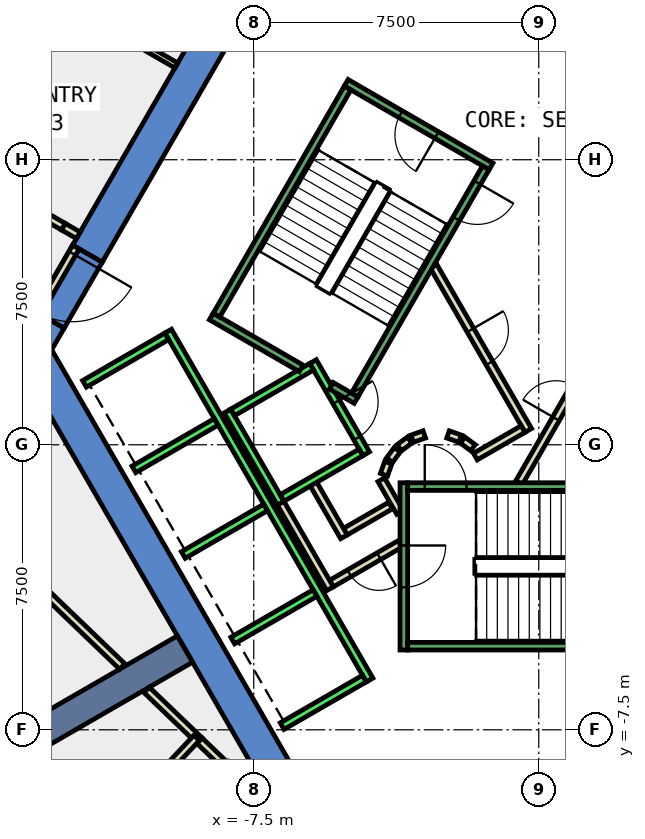
"""IFC4 building model, lengths in metres.
Left out: names, types, materials, properties, quantities, classifications, styles, units other than length and angle.
Written with IfcOpenShell. Run it as: python <this file> out.ifc"""

import sys

from ifc_helpers import new_model, si_unit, direction, frame, frame_2d, origin, place, context, subcontext, project, spatial, polyline, rectangle, outline, extrude, element, fill, save


model = new_model("IFC4")
c1 = context("Model", 3, precision=1e-05, world=origin(), true_north=direction((0.0, 1.0)))
c2 = subcontext(c1, "Body", "Model", "MODEL_VIEW")
j1 = project(units=[si_unit("LENGTHUNIT", "METRE"), si_unit("PLANEANGLEUNIT", "RADIAN")], contexts=[c1])
p1 = place(None, origin())
s1 = spatial("IfcSite", under=j1, at=p1, CompositionType="ELEMENT")
p2 = place(p1, origin())
s2 = spatial("IfcBuilding", under=s1, at=p2, CompositionType="ELEMENT")
p3 = place(p2, frame((0.0, 0.0, 99.2)))
s3 = spatial("IfcBuildingStorey", under=s2, at=p3, CompositionType="ELEMENT", Elevation=99.2)
p4 = place(p3, frame((0.0, 0.0, -0.4)))
e1 = element("IfcWall", 1, at=p4, inside=s3, PredefinedType="SHEAR", context=c2, shape_type="SweptSolid", body=[
    extrude(outline(polyline([(-12.267, 5.252), (-11.488, 4.802), (-6.409, 13.6), (-6.928, 14.5), (-12.267, 5.252)])), origin(), (0.0, 0.0, 1.0), 4.2),
])
p5 = place(p3, frame((0.0, 0.0, -0.4)))
e2 = element("IfcWall", 2, at=p5, inside=s3, PredefinedType="SHEAR", context=c2, shape_type="SweptSolid", body=[
    extrude(outline(polyline([(-12.488, 3.07), (-13.267, 3.52), (-13.856, 2.5), (-12.817, 2.5), (-12.488, 3.07)])), origin(), (0.0, 0.0, 1.0), 4.2),
])
p6 = place(p3, frame((0.0, 0.0, 3.6)))
e3 = element("IfcWall", 3, at=p6, inside=s3, PredefinedType="SHEAR", context=c2, shape_type="SweptSolid", body=[
    extrude(outline(polyline([(-13.267, 3.52), (-12.488, 3.07), (-11.488, 4.802), (-12.267, 5.252), (-13.267, 3.52)])), origin(), (0.0, 0.0, 1.0), 0.2),
])
p7 = place(p3, frame((0.0, 0.0, -0.4)))
e4 = element("IfcWall", 4, at=p7, inside=s3, PredefinedType="SHEAR", context=c2, shape_type="SweptSolid", body=[
    extrude(outline(polyline([(-13.856, 2.5), (-6.928, -9.5), (-6.409, -8.6), (-12.817, 2.5), (-13.856, 2.5)])), origin(), (0.0, 0.0, 1.0), 4.2),
])
p8 = place(p3, frame((-9.31, -5.375, -0.4), z_axis=(0.0, 0.0, 1.0), x_axis=(-0.866017533419, -0.500013631625, 0.0)))
e5 = element("IfcWall", 5, at=p8, inside=s3, PredefinedType="SHEAR", context=c2, shape_type="SweptSolid", body=[
    extrude(rectangle(XDim=9.0, YDim=0.8, at=frame_2d((4.5, 0.0))), origin(), (0.0, 0.0, 1.0), 4.2),
])
p9 = place(p3, frame((-15.835, 7.658, 0.0), z_axis=(0.0, 0.0, 1.0), x_axis=(0.866076614194, -0.499911290476, 0.0)))
e6 = element("IfcWall", 6, at=p9, inside=s3, PredefinedType="PARTITIONING", context=c2, shape_type="SweptSolid", body=[
    extrude(rectangle(XDim=3.843, YDim=0.2, at=frame_2d((1.921, 0.0))), origin(), (0.0, 0.0, 1.0), 3.8),
])
p10 = place(p9, frame((1.646, 0.0, 0.0)))
e7 = element("IfcOpeningElement", 7, at=p10, cuts=e6, PredefinedType="OPENING", context=c2, shape_type="SweptSolid", body=[
    extrude(rectangle(XDim=1.0, YDim=2.1, at=frame_2d((0.5, 1.05))), frame((0.0, 0.11, 0.0), z_axis=(0.0, -1.0, 0.0), x_axis=(1.0, 0.0, 0.0)), (0.0, 0.0, 1.0), 0.22),
])
p11 = place(p3, frame((-3.9, -1.599, 0.0), z_axis=(0.0, 0.0, 1.0), x_axis=(-0.865969445389, -0.500096910261, 0.0)))
e8 = element("IfcWall", 8, at=p11, inside=s3, PredefinedType="PARTITIONING", context=c2, shape_type="SweptSolid", body=[
    extrude(rectangle(XDim=1.373, YDim=0.2, at=frame_2d((0.687, 0.0))), origin(), (0.0, 0.0, 1.0), 3.8),
])
p12 = place(p3, frame((-5.126, -2.422, 0.0), z_axis=(0.0, 0.0, 1.0), x_axis=(-0.500062241894, 0.865989465428, 0.0)))
e9 = element("IfcWall", 9, at=p12, inside=s3, PredefinedType="PARTITIONING", context=c2, shape_type="SweptSolid", body=[
    extrude(rectangle(XDim=1.7, YDim=0.2, at=frame_2d((0.85, 0.0))), origin(), (0.0, 0.0, 1.0), 3.8),
])
p13 = place(p3, frame((-3.65, -2.61, 0.0), z_axis=(0.0, 0.0, 1.0), x_axis=(-0.866072462134, -0.499918483688, 0.0)))
e10 = element("IfcWall", 10, at=p13, inside=s3, PredefinedType="PARTITIONING", context=c2, shape_type="SweptSolid", body=[
    extrude(rectangle(XDim=2.084, YDim=0.2, at=frame_2d((1.042, 0.0))), origin(), (0.0, 0.0, 1.0), 3.8),
])
p14 = place(p13, frame((0.642, 0.0, 0.0)))
e11 = element("IfcOpeningElement", 11, at=p14, cuts=e10, PredefinedType="OPENING", context=c2, shape_type="SweptSolid", body=[
    extrude(rectangle(XDim=0.9, YDim=2.1, at=frame_2d((0.45, 1.05))), frame((0.0, 0.11, 0.0), z_axis=(0.0, -1.0, 0.0), x_axis=(1.0, 0.0, 0.0)), (0.0, 0.0, 1.0), 0.22),
])
p15 = place(p3, frame((-5.492, -3.788, 0.0), z_axis=(0.0, 0.0, 1.0), x_axis=(-0.500008949224, 0.866020236886, 0.0)))
e12 = element("IfcWall", 12, at=p15, inside=s3, PredefinedType="PARTITIONING", context=c2, shape_type="SweptSolid", body=[
    extrude(rectangle(XDim=2.68, YDim=0.2, at=frame_2d((1.34, 0.0))), origin(), (0.0, 0.0, 1.0), 3.8),
])
p16 = place(p3, frame((-4.145, -0.92, 0.0), z_axis=(0.0, 0.0, 1.0), x_axis=(0.499743786207, -0.866173278362, 0.0)))
e13 = element("IfcWall", 13, at=p16, inside=s3, PredefinedType="PARTITIONING", context=c2, shape_type="SweptSolid", body=[
    extrude(rectangle(XDim=0.991, YDim=0.2, at=frame_2d((0.495, 0.0))), origin(), (0.0, 0.0, 1.0), 3.8),
])
p17 = place(p3, frame((-9.537, 9.981, 0.0), z_axis=(0.0, 0.0, 1.0), x_axis=(-0.866007866579, 0.5000303741, 0.0)))
e14 = element("IfcWall", 14, at=p17, inside=s3, PredefinedType="PARTITIONING", context=c2, shape_type="SweptSolid", body=[
    extrude(rectangle(XDim=4.278, YDim=0.15, at=frame_2d((2.139, 0.0))), origin(), (0.0, 0.0, 1.0), 3.8),
])
p18 = place(p3, frame((-0.52, -1.0, 0.0), z_axis=(0.0, 0.0, 1.0), x_axis=(0.50011622646, 0.865958290007, 0.0)))
e15 = element("IfcWall", 15, at=p18, inside=s3, PredefinedType="PARTITIONING", context=c2, shape_type="SweptSolid", body=[
    extrude(rectangle(XDim=4.991, YDim=0.2, at=frame_2d((2.496, 0.0))), origin(), (0.0, 0.0, 1.0), 3.8),
])
p19 = place(p18, frame((1.945, 0.0, 0.0)))
e16 = element("IfcOpeningElement", 16, at=p19, cuts=e15, PredefinedType="OPENING", context=c2, shape_type="SweptSolid", body=[
    extrude(rectangle(XDim=1.0, YDim=2.1, at=frame_2d((0.5, 1.05))), frame((0.0, 0.11, 0.0), z_axis=(0.0, -1.0, 0.0), x_axis=(1.0, 0.0, 0.0)), (0.0, 0.0, 1.0), 0.22),
])
p20 = place(p3, frame((-2.771, 4.7, 0.0), z_axis=(0.0, 0.0, 1.0), x_axis=(0.499969479948, -0.866043023828, 0.0)))
e17 = element("IfcWall", 17, at=p20, inside=s3, PredefinedType="PARTITIONING", context=c2, shape_type="SweptSolid", body=[
    extrude(rectangle(XDim=4.99, YDim=0.2, at=frame_2d((2.495, 0.0))), origin(), (0.0, 0.0, 1.0), 3.8),
])
p21 = place(p20, frame((1.945, 0.0, 0.0)))
e18 = element("IfcOpeningElement", 18, at=p21, cuts=e17, PredefinedType="OPENING", context=c2, shape_type="SweptSolid", body=[
    extrude(rectangle(XDim=1.0, YDim=2.1, at=frame_2d((0.5, 1.05))), frame((0.0, 0.11, 0.0), z_axis=(0.0, -1.0, 0.0), x_axis=(1.0, 0.0, 0.0)), (0.0, 0.0, 1.0), 0.22),
])
p22 = place(p3, frame((-0.412, 0.414, 0.0), z_axis=(0.0, 0.0, 1.0), x_axis=(-0.866017369001, -0.500013916395, 0.0)))
e19 = element("IfcWall", 19, at=p22, inside=s3, PredefinedType="PARTITIONING", context=c2, shape_type="SweptSolid", body=[
    extrude(rectangle(XDim=1.45, YDim=0.2, at=frame_2d((0.725, 0.0))), origin(), (0.0, 0.0, 1.0), 3.8),
])
p23 = place(p3, frame((-1.731, -0.077, 0.0), z_axis=(0.0, 0.0, 1.0), x_axis=(-0.804311165252, 0.594208338422, 0.0)))
e20 = element("IfcWall", 20, at=p23, inside=s3, PredefinedType="PARTITIONING", context=c2, shape_type="SweptSolid", body=[
    extrude(rectangle(XDim=0.338, YDim=0.2, at=frame_2d((0.169, 0.0))), origin(), (0.0, 0.0, 1.0), 3.8),
])
p24 = place(p3, frame((-2.07, 0.16, 0.0), z_axis=(0.0, 0.0, 1.0), x_axis=(-0.942199461132, 0.335052496547, 0.0)))
e21 = element("IfcWall", 21, at=p24, inside=s3, PredefinedType="PARTITIONING", context=c2, shape_type="SweptSolid", body=[
    extrude(rectangle(XDim=0.337, YDim=0.2, at=frame_2d((0.169, 0.0))), origin(), (0.0, 0.0, 1.0), 3.8),
])
p25 = place(p3, frame((-3.012, 0.273, 0.0), z_axis=(0.0, 0.0, 1.0), x_axis=(-0.942280615813, -0.334824194261, 0.0)))
e22 = element("IfcWall", 22, at=p25, inside=s3, PredefinedType="PARTITIONING", context=c2, shape_type="SweptSolid", body=[
    extrude(rectangle(XDim=0.338, YDim=0.2, at=frame_2d((0.169, 0.0))), origin(), (0.0, 0.0, 1.0), 3.8),
])
p26 = place(p3, frame((-3.397, 0.124, 0.0), z_axis=(0.0, 0.0, 1.0), x_axis=(-0.804311165252, -0.594208338422, 0.0)))
e23 = element("IfcWall", 23, at=p26, inside=s3, PredefinedType="PARTITIONING", context=c2, shape_type="SweptSolid", body=[
    extrude(rectangle(XDim=0.338, YDim=0.2, at=frame_2d((0.169, 0.0))), origin(), (0.0, 0.0, 1.0), 3.8),
])
p27 = place(p3, frame((-3.723, -0.131, 0.0), z_axis=(0.0, 0.0, 1.0), x_axis=(-0.594675113454, -0.803966112121, 0.0)))
e24 = element("IfcWall", 24, at=p27, inside=s3, PredefinedType="PARTITIONING", context=c2, shape_type="SweptSolid", body=[
    extrude(rectangle(XDim=0.338, YDim=0.2, at=frame_2d((0.169, 0.0))), origin(), (0.0, 0.0, 1.0), 3.8),
])
p28 = place(p3, frame((-3.96, -0.47, 0.0), z_axis=(0.0, 0.0, 1.0), x_axis=(-0.334824194261, -0.942280615813, 0.0)))
e25 = element("IfcWall", 25, at=p28, inside=s3, PredefinedType="PARTITIONING", context=c2, shape_type="SweptSolid", body=[
    extrude(rectangle(XDim=0.338, YDim=0.2, at=frame_2d((0.169, 0.0))), origin(), (0.0, 0.0, 1.0), 3.8),
])
p29 = place(p3, frame((-8.93, -7.783, 0.0), z_axis=(0.0, 0.0, 1.0), x_axis=(0.720954255291, -0.692982656189, 0.0)))
e26 = element("IfcWall", 26, at=p29, inside=s3, PredefinedType="PARTITIONING", context=c2, shape_type="SweptSolid", body=[
    extrude(rectangle(XDim=0.89, YDim=0.2, at=frame_2d((0.445, 0.0))), origin(), (0.0, 0.0, 1.0), 3.8),
])
p30 = place(p3, frame((-8.93, -7.783, 0.0), z_axis=(0.0, 0.0, 1.0), x_axis=(-0.72124523191, 0.692679807305, 0.0)))
e27 = element("IfcWall", 27, at=p30, inside=s3, PredefinedType="PARTITIONING", context=c2, shape_type="SweptSolid", body=[
    extrude(rectangle(XDim=1.923, YDim=0.2, at=frame_2d((0.961, 0.0))), origin(), (0.0, 0.0, 1.0), 3.8),
])
p31 = place(p3, frame((-13.865, -12.876, 0.0), z_axis=(0.0, 0.0, 1.0), x_axis=(0.685651384846, 0.727930064263, 0.0)))
e28 = element("IfcWall", 28, at=p31, inside=s3, PredefinedType="PARTITIONING", context=c2, shape_type="SweptSolid", body=[
    extrude(rectangle(XDim=7.091, YDim=0.2, at=frame_2d((3.545, 0.0))), origin(), (0.0, 0.0, 1.0), 3.8),
])
p32 = place(p3, frame((-12.18, 5.202, 0.0), z_axis=(0.0, 0.0, 1.0), x_axis=(-0.50002537861, -0.866010750942, 0.0)))
e29 = element("IfcWall", 29, at=p32, inside=s3, PredefinedType="PARTITIONING", context=c2, shape_type="SweptSolid", body=[
    extrude(rectangle(XDim=2.0, YDim=0.2, at=frame_2d((1.0, 0.0))), origin(), (0.0, 0.0, 1.0), 2.4),
])
p33 = place(p32, frame((0.19, 0.0, 0.0)))
e30 = element("IfcOpeningElement", 30, at=p33, cuts=e29, PredefinedType="OPENING", context=c2, shape_type="SweptSolid", body=[
    extrude(rectangle(XDim=1.8, YDim=2.1, at=frame_2d((0.9, 1.05))), frame((0.0, 0.11, 0.0), z_axis=(0.0, -1.0, 0.0), x_axis=(1.0, 0.0, 0.0)), (0.0, 0.0, 1.0), 0.22),
])
p34 = place(p3, frame((-10.96, -5.834, 0.0), z_axis=(0.0, 0.0, 1.0), x_axis=(-0.721236335428, 0.692689070549, 0.0)))
e31 = element("IfcWall", 31, at=p34, inside=s3, PredefinedType="PARTITIONING", context=c2, shape_type="SweptSolid", body=[
    extrude(rectangle(XDim=11.246, YDim=0.2, at=frame_2d((5.623, 0.0))), origin(), (0.0, 0.0, 1.0), 3.8),
])
p35 = place(p3, frame((-12.507, 5.737, 0.0), z_axis=(0.0, 0.0, 1.0), x_axis=(0.866167537795, -0.499753735824, 0.0)))
e32 = element("IfcWall", 32, at=p35, inside=s3, PredefinedType="PARTITIONING", context=c2, shape_type="SweptSolid", body=[
    extrude(rectangle(XDim=0.45, YDim=0.2, at=frame_2d((0.225, 0.0))), origin(), (0.0, 0.0, 1.0), 2.4),
])
p36 = place(p3, frame((-5.94, 2.188, 0.0), z_axis=(0.0, 0.0, 1.0), x_axis=(0.49994636267, -0.866056369097, 0.0)))
e33 = element("IfcWall", 33, at=p36, inside=s3, PredefinedType="STANDARD", context=c2, shape_type="SweptSolid", body=[
    extrude(rectangle(XDim=2.8, YDim=0.2, at=frame_2d((1.4, 0.0))), origin(), (0.0, 0.0, 1.0), 3.8),
])
p37 = place(p36, frame((1.225, 0.0, 0.0)))
e34 = element("IfcOpeningElement", 34, at=p37, cuts=e33, PredefinedType="OPENING", context=c2, shape_type="SweptSolid", body=[
    extrude(rectangle(XDim=1.1, YDim=2.1, at=frame_2d((0.55, 1.05))), frame((0.0, 0.11, 0.0), z_axis=(0.0, -1.0, 0.0), x_axis=(1.0, 0.0, 0.0)), (0.0, 0.0, 1.0), 0.22),
])
p38 = place(p3, frame((-8.192, 0.888, 0.0), z_axis=(0.0, 0.0, 1.0), x_axis=(0.49994636267, -0.866056369097, 0.0)))
e35 = element("IfcWall", 35, at=p38, inside=s3, PredefinedType="STANDARD", context=c2, shape_type="SweptSolid", body=[
    extrude(rectangle(XDim=2.8, YDim=0.2, at=frame_2d((1.4, 0.0))), origin(), (0.0, 0.0, 1.0), 3.8),
])
for number, where, z_axis, x_axis in (
    (36, (-5.977, 2.052, 0.0), (0.0, 0.0, 1.0), (-0.866, -0.5, 0.0)),
    (37, (-4.677, -0.2, 0.0), (0.0, 0.0, 1.0), (-0.866, -0.5, 0.0)),
):
    element("IfcWall", number, at=place(p3, frame(where, z_axis=z_axis, x_axis=x_axis)), inside=s3, PredefinedType="STANDARD", context=c2, shape_type="SweptSolid", body=[
        extrude(rectangle(XDim=2.399, YDim=0.2, at=frame_2d((1.2, 0.0))), origin(), (0.0, 0.0, 1.0), 3.8),
    ])
p39 = place(p3, frame((-9.751, 2.99, 0.0), z_axis=(0.0, 0.0, 1.0), x_axis=(0.50000090737, -0.866024879913, 0.0)))
e38 = element("IfcWall", 38, at=p39, inside=s3, PredefinedType="STANDARD", context=c2, shape_type="SweptSolid", body=[
    extrude(rectangle(XDim=10.6, YDim=0.2, at=frame_2d((5.3, 0.0))), origin(), (0.0, 0.0, 1.0), 3.8),
])
p40 = place(p3, frame((-9.788, 2.853, 0.0), z_axis=(0.0, 0.0, 1.0), x_axis=(-0.865998541277, -0.500046524342, 0.0)))
e39 = element("IfcWall", 39, at=p40, inside=s3, PredefinedType="STANDARD", context=c2, shape_type="SweptSolid", body=[
    extrude(rectangle(XDim=2.5, YDim=0.2, at=frame_2d((1.25, 0.0))), origin(), (0.0, 0.0, 1.0), 3.8),
])
for number, where, z_axis, x_axis in (
    (40, (-8.488, 0.602, 0.0), (0.0, 0.0, 1.0), (-0.866, -0.5, 0.0)),
    (41, (-7.188, -1.65, 0.0), (0.0, 0.0, 1.0), (-0.866, -0.5, 0.0)),
    (42, (-5.888, -3.902, 0.0), (0.0, 0.0, 1.0), (-0.866, -0.5, 0.0)),
    (43, (-4.588, -6.153, 0.0), (0.0, 0.0, 1.0), (-0.866, -0.5, 0.0)),
):
    element("IfcWall", number, at=place(p3, frame(where, z_axis=z_axis, x_axis=x_axis)), inside=s3, PredefinedType="STANDARD", context=c2, shape_type="SweptSolid", body=[
        extrude(rectangle(XDim=2.5, YDim=0.2, at=frame_2d((1.25, 0.0))), origin(), (0.0, 0.0, 1.0), 3.8),
    ])
p41 = place(p3, frame((-3.55, -1.0, 0.0), z_axis=(0.0, 0.0, 1.0), x_axis=(0.0, -1.0, 0.0)))
e44 = element("IfcWall", 44, at=p41, inside=s3, PredefinedType="STANDARD", context=c2, shape_type="SweptSolid", body=[
    extrude(rectangle(XDim=4.4, YDim=0.2, at=frame_2d((2.2, 0.0))), origin(), (0.0, 0.0, 1.0), 3.8),
])
p42 = place(p41, frame((1.65, 0.0, 0.0)))
e45 = element("IfcOpeningElement", 45, at=p42, cuts=e44, PredefinedType="OPENING", context=c2, shape_type="SweptSolid", body=[
    extrude(rectangle(XDim=1.1, YDim=2.2, at=frame_2d((0.55, 1.1))), frame((0.0, 0.11, 0.0), z_axis=(0.0, -1.0, 0.0), x_axis=(1.0, 0.0, 0.0)), (0.0, 0.0, 1.0), 0.22),
])
p43 = place(p3, frame((-3.45, -1.1, 0.0), z_axis=(0.0, 0.0, 1.0), x_axis=(1.0, 0.0, 0.0)))
e46 = element("IfcWall", 46, at=p43, inside=s3, PredefinedType="STANDARD", context=c2, shape_type="SweptSolid", body=[
    extrude(rectangle(XDim=6.9, YDim=0.2, at=frame_2d((3.45, 0.0))), origin(), (0.0, 0.0, 1.0), 3.8),
])
p44 = place(p43, frame((0.45, 0.0, 0.0)))
e47 = element("IfcOpeningElement", 47, at=p44, cuts=e46, PredefinedType="OPENING", context=c2, shape_type="SweptSolid", body=[
    extrude(rectangle(XDim=1.1, YDim=2.2, at=frame_2d((0.55, 1.1))), frame((0.0, 0.11, 0.0), z_axis=(0.0, -1.0, 0.0), x_axis=(1.0, 0.0, 0.0)), (0.0, 0.0, 1.0), 0.22),
])
p45 = place(p3, frame((-3.45, -5.3, 0.0), z_axis=(0.0, 0.0, 1.0), x_axis=(1.0, 0.0, 0.0)))
e48 = element("IfcWall", 48, at=p45, inside=s3, PredefinedType="STANDARD", context=c2, shape_type="SweptSolid", body=[
    extrude(rectangle(XDim=6.9, YDim=0.2, at=frame_2d((3.45, 0.0))), origin(), (0.0, 0.0, 1.0), 3.8),
])
p46 = place(p3, frame((-1.256, 7.324, 0.0), z_axis=(0.0, 0.0, 1.0), x_axis=(-0.866046073146, 0.499964197906, 0.0)))
e49 = element("IfcWall", 49, at=p46, inside=s3, PredefinedType="STANDARD", context=c2, shape_type="SweptSolid", body=[
    extrude(rectangle(XDim=4.4, YDim=0.2, at=frame_2d((2.2, 0.0))), origin(), (0.0, 0.0, 1.0), 3.8),
])
p47 = place(p46, frame((1.65, 0.0, 0.0)))
e50 = element("IfcOpeningElement", 50, at=p47, cuts=e49, PredefinedType="OPENING", context=c2, shape_type="SweptSolid", body=[
    extrude(rectangle(XDim=1.1, YDim=2.2, at=frame_2d((0.55, 1.1))), frame((0.0, 0.11, 0.0), z_axis=(0.0, -1.0, 0.0), x_axis=(1.0, 0.0, 0.0)), (0.0, 0.0, 1.0), 0.22),
])
p48 = place(p3, frame((-6.25, 2.01, 0.0), z_axis=(0.0, 0.0, 1.0), x_axis=(-0.86611865017, 0.499838457731, 0.0)))
e51 = element("IfcWall", 51, at=p48, inside=s3, PredefinedType="STANDARD", context=c2, shape_type="SweptSolid", body=[
    extrude(rectangle(XDim=2.733, YDim=0.2, at=frame_2d((1.366, 0.0))), origin(), (0.0, 0.0, 1.0), 3.8),
])
p49 = place(p3, frame((-4.806, 1.176, 0.0), z_axis=(0.0, 0.0, 1.0), x_axis=(-0.866558586415, 0.499075361355, 0.0)))
e52 = element("IfcWall", 52, at=p49, inside=s3, PredefinedType="STANDARD", context=c2, shape_type="SweptSolid", body=[
    extrude(rectangle(XDim=0.751, YDim=0.2, at=frame_2d((0.376, 0.0))), origin(), (0.0, 0.0, 1.0), 3.8),
])
p50 = place(p3, frame((-1.393, 7.288, 0.0), z_axis=(0.0, 0.0, 1.0), x_axis=(-0.499963383562, -0.866046543262, 0.0)))
e53 = element("IfcWall", 53, at=p50, inside=s3, PredefinedType="STANDARD", context=c2, shape_type="SweptSolid", body=[
    extrude(rectangle(XDim=6.9, YDim=0.2, at=frame_2d((3.45, 0.0))), origin(), (0.0, 0.0, 1.0), 3.8),
])
p51 = place(p50, frame((0.45, 0.0, 0.0)))
e54 = element("IfcOpeningElement", 54, at=p51, cuts=e53, PredefinedType="OPENING", context=c2, shape_type="SweptSolid", body=[
    extrude(rectangle(XDim=1.1, YDim=2.2, at=frame_2d((0.55, 1.1))), frame((0.0, 0.11, 0.0), z_axis=(0.0, -1.0, 0.0), x_axis=(1.0, 0.0, 0.0)), (0.0, 0.0, 1.0), 0.22),
])
p52 = place(p3, frame((-5.03, 9.388, 0.0), z_axis=(0.0, 0.0, 1.0), x_axis=(-0.499978703459, -0.866037698999, 0.0)))
e55 = element("IfcWall", 55, at=p52, inside=s3, PredefinedType="STANDARD", context=c2, shape_type="SweptSolid", body=[
    extrude(rectangle(XDim=6.9, YDim=0.2, at=frame_2d((3.45, 0.0))), origin(), (0.0, 0.0, 1.0), 3.8),
])
p53 = place(p19, origin())
e56 = element("IfcDoor", 56, at=p53, inside=s3, OperationType="SINGLE_SWING_LEFT", PredefinedType="DOOR", context=c2, shape_type="SweptSolid", body=[
    extrude(rectangle(XDim=1.0, YDim=2.1, at=frame_2d((0.5, 1.05))), frame((0.0, 0.025, 0.0), z_axis=(0.0, -1.0, 0.0), x_axis=(1.0, 0.0, 0.0)), (0.0, 0.0, 1.0), 0.05),
])
fill(e16, e56)
p54 = place(p21, origin())
e57 = element("IfcDoor", 57, at=p54, inside=s3, OperationType="SINGLE_SWING_RIGHT", PredefinedType="DOOR", context=c2, shape_type="SweptSolid", body=[
    extrude(rectangle(XDim=1.0, YDim=2.1, at=frame_2d((0.5, 1.05))), frame((0.0, 0.025, 0.0), z_axis=(0.0, -1.0, 0.0), x_axis=(1.0, 0.0, 0.0)), (0.0, 0.0, 1.0), 0.05),
])
fill(e18, e57)
p55 = place(p14, origin())
e58 = element("IfcDoor", 58, at=p55, inside=s3, OperationType="SINGLE_SWING_LEFT", PredefinedType="DOOR", context=c2, shape_type="SweptSolid", body=[
    extrude(rectangle(XDim=0.9, YDim=2.1, at=frame_2d((0.45, 1.05))), frame((0.0, 0.025, 0.0), z_axis=(0.0, -1.0, 0.0), x_axis=(1.0, 0.0, 0.0)), (0.0, 0.0, 1.0), 0.05),
])
fill(e11, e58)
p56 = place(p33, origin())
e59 = element("IfcDoor", 59, at=p56, inside=s3, OperationType="DOUBLE_DOOR_SINGLE_SWING", PredefinedType="DOOR", context=c2, shape_type="SweptSolid", body=[
    extrude(rectangle(XDim=1.8, YDim=2.1, at=frame_2d((0.9, 1.05))), frame((0.0, 0.025, 0.0), z_axis=(0.0, -1.0, 0.0), x_axis=(1.0, 0.0, 0.0)), (0.0, 0.0, 1.0), 0.05),
])
fill(e30, e59)
p57 = place(p37, origin())
e60 = element("IfcDoor", 60, at=p57, inside=s3, OperationType="SLIDING_TO_LEFT", PredefinedType="DOOR", context=c2, shape_type="SweptSolid", body=[
    extrude(rectangle(XDim=1.1, YDim=2.1, at=frame_2d((0.55, 1.05))), frame((0.0, 0.025, 0.0), z_axis=(0.0, -1.0, 0.0), x_axis=(1.0, 0.0, 0.0)), (0.0, 0.0, 1.0), 0.05),
])
fill(e34, e60)
p58 = place(p44, origin())
e61 = element("IfcDoor", 61, at=p58, inside=s3, OperationType="SINGLE_SWING_LEFT", PredefinedType="DOOR", context=c2, shape_type="SweptSolid", body=[
    extrude(rectangle(XDim=1.1, YDim=2.2, at=frame_2d((0.55, 1.1))), frame((0.0, 0.025, 0.0), z_axis=(0.0, -1.0, 0.0), x_axis=(1.0, 0.0, 0.0)), (0.0, 0.0, 1.0), 0.05),
])
fill(e47, e61)
p59 = place(p42, origin())
e62 = element("IfcDoor", 62, at=p59, inside=s3, OperationType="SINGLE_SWING_LEFT", PredefinedType="DOOR", context=c2, shape_type="SweptSolid", body=[
    extrude(rectangle(XDim=1.1, YDim=2.2, at=frame_2d((0.55, 1.1))), frame((0.0, 0.025, 0.0), z_axis=(0.0, -1.0, 0.0), x_axis=(1.0, 0.0, 0.0)), (0.0, 0.0, 1.0), 0.05),
])
fill(e45, e62)
p60 = place(p51, origin())
e63 = element("IfcDoor", 63, at=p60, inside=s3, OperationType="SINGLE_SWING_LEFT", PredefinedType="DOOR", context=c2, shape_type="SweptSolid", body=[
    extrude(rectangle(XDim=1.1, YDim=2.2, at=frame_2d((0.55, 1.1))), frame((0.0, 0.025, 0.0), z_axis=(0.0, -1.0, 0.0), x_axis=(1.0, 0.0, 0.0)), (0.0, 0.0, 1.0), 0.05),
])
fill(e54, e63)
p61 = place(p47, origin())
e64 = element("IfcDoor", 64, at=p61, inside=s3, OperationType="SINGLE_SWING_LEFT", PredefinedType="DOOR", context=c2, shape_type="SweptSolid", body=[
    extrude(rectangle(XDim=1.1, YDim=2.2, at=frame_2d((0.55, 1.1))), frame((0.0, 0.025, 0.0), z_axis=(0.0, -1.0, 0.0), x_axis=(1.0, 0.0, 0.0)), (0.0, 0.0, 1.0), 0.05),
])
fill(e50, e64)
save(model, sys.argv[1])
